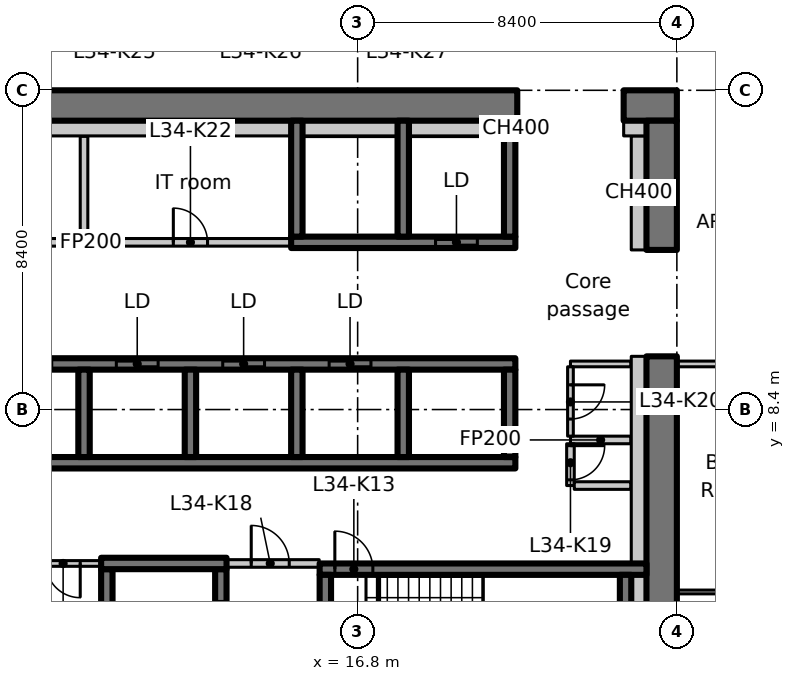
"""IFC4 building model, lengths in metres.
Left out: names, types, materials, properties, quantities, classifications, styles, units other than length and angle.
Written with IfcOpenShell. Run it as: python <this file> out.ifc"""

import sys

from ifc_helpers import new_model, si_unit, direction, frame, frame_2d, origin, place, context, subcontext, project, spatial, rectangle, extrude, element, fill, save


model = new_model("IFC4")
c1 = context("Model", 3, precision=1e-05, world=origin(), true_north=direction((0.0, 1.0)))
c2 = subcontext(c1, "Body", "Model", "MODEL_VIEW")
j1 = project(units=[si_unit("LENGTHUNIT", "METRE"), si_unit("PLANEANGLEUNIT", "RADIAN")], contexts=[c1])
p1 = place(None, origin())
s1 = spatial("IfcSite", under=j1, at=p1, CompositionType="ELEMENT")
p2 = place(p1, origin())
s2 = spatial("IfcBuilding", under=s1, at=p2, CompositionType="ELEMENT")
p3 = place(p2, frame((0.0, 0.0, 138.5)))
s3 = spatial("IfcBuildingStorey", under=s2, at=p3, CompositionType="ELEMENT", Elevation=138.5)
p4 = place(p3, frame((-1.1, 16.4, 0.0), z_axis=(0.0, 0.0, 1.0), x_axis=(1.0, 0.0, 0.0)))
e1 = element("IfcWall", 1, at=p4, inside=s3, PredefinedType="SHEAR", context=c2, shape_type="SweptSolid", body=[
    extrude(rectangle(XDim=22.1, YDim=0.8, at=frame_2d((11.05, 0.0))), origin(), (0.0, 0.0, 1.0), 3.35),
])
p5 = place(p4, frame((3.15, 0.0, 0.0)))
e2 = element("IfcOpeningElement", 2, at=p5, cuts=e1, PredefinedType="OPENING", context=c2, shape_type="SweptSolid", body=[
    extrude(rectangle(XDim=1.1, YDim=2.3, at=frame_2d((0.55, 1.15))), frame((0.0, 0.41, 0.0), z_axis=(0.0, -1.0, 0.0), x_axis=(1.0, 0.0, 0.0)), (0.0, 0.0, 1.0), 0.82),
])
p6 = place(p3, frame((23.8, 16.4, 0.0), z_axis=(0.0, 0.0, 1.0), x_axis=(1.0, 0.0, 0.0)))
e3 = element("IfcWall", 3, at=p6, inside=s3, PredefinedType="SHEAR", context=c2, shape_type="SweptSolid", body=[
    extrude(rectangle(XDim=1.4, YDim=0.8, at=frame_2d((0.7, 0.0))), origin(), (0.0, 0.0, 1.0), 3.35),
])
p7 = place(p3, frame((24.8, 0.8, 0.0), z_axis=(0.0, 0.0, 1.0), x_axis=(0.0, 1.0, 0.0)))
e4 = element("IfcWall", 4, at=p7, inside=s3, PredefinedType="SHEAR", context=c2, shape_type="SweptSolid", body=[
    extrude(rectangle(XDim=9.0, YDim=0.8, at=frame_2d((4.5, 0.0))), origin(), (0.0, 0.0, 1.0), 3.35),
])
p8 = place(p3, frame((24.8, 12.6, 0.0), z_axis=(0.0, 0.0, 1.0), x_axis=(0.0, 1.0, 0.0)))
e5 = element("IfcWall", 5, at=p8, inside=s3, PredefinedType="SHEAR", context=c2, shape_type="SweptSolid", body=[
    extrude(rectangle(XDim=3.4, YDim=0.8, at=frame_2d((1.7, 0.0))), origin(), (0.0, 0.0, 1.0), 3.35),
])
p9 = place(p3, frame((24.2, 12.6, 0.0), z_axis=(0.0, 0.0, 1.0), x_axis=(0.0, 1.0, 0.0)))
e6 = element("IfcWall", 6, at=p9, inside=s3, PredefinedType="PARTITIONING", context=c2, shape_type="SweptSolid", body=[
    extrude(rectangle(XDim=3.0, YDim=0.4, at=frame_2d((1.5, 0.0))), origin(), (0.0, 0.0, 1.0), 3.35),
])
p10 = place(p3, frame((23.8, 15.8, 0.0), z_axis=(0.0, 0.0, 1.0), x_axis=(1.0, 0.0, 0.0)))
e7 = element("IfcWall", 7, at=p10, inside=s3, PredefinedType="PARTITIONING", context=c2, shape_type="SweptSolid", body=[
    extrude(rectangle(XDim=0.6, YDim=0.4, at=frame_2d((0.3, 0.0))), origin(), (0.0, 0.0, 1.0), 3.35),
])
p11 = place(p3, frame((0.8, 7.0, 0.0), z_axis=(0.0, 0.0, 1.0), x_axis=(1.0, 0.0, 0.0)))
e8 = element("IfcWall", 8, at=p11, inside=s3, PredefinedType="SHEAR", context=c2, shape_type="SweptSolid", body=[
    extrude(rectangle(XDim=20.15, YDim=0.3, at=frame_2d((10.075, 0.0))), origin(), (0.0, 0.0, 1.0), 3.35),
])
p12 = place(p3, frame((0.8, 9.6, 0.0), z_axis=(0.0, 0.0, 1.0), x_axis=(1.0, 0.0, 0.0)))
e9 = element("IfcWall", 9, at=p12, inside=s3, PredefinedType="SHEAR", context=c2, shape_type="SweptSolid", body=[
    extrude(rectangle(XDim=20.15, YDim=0.3, at=frame_2d((10.075, 0.0))), origin(), (0.0, 0.0, 1.0), 3.35),
])
p13 = place(p12, frame((1.25, 0.0, 0.0)))
e10 = element("IfcOpeningElement", 10, at=p13, cuts=e9, PredefinedType="OPENING", context=c2, shape_type="SweptSolid", body=[
    extrude(rectangle(XDim=1.1, YDim=2.3, at=frame_2d((0.55, 1.15))), frame((0.0, 0.16, 0.0), z_axis=(0.0, -1.0, 0.0), x_axis=(1.0, 0.0, 0.0)), (0.0, 0.0, 1.0), 0.32),
])
p14 = place(p12, frame((4.05, 0.0, 0.0)))
e11 = element("IfcOpeningElement", 11, at=p14, cuts=e9, PredefinedType="OPENING", context=c2, shape_type="SweptSolid", body=[
    extrude(rectangle(XDim=1.1, YDim=2.3, at=frame_2d((0.55, 1.15))), frame((0.0, 0.16, 0.0), z_axis=(0.0, -1.0, 0.0), x_axis=(1.0, 0.0, 0.0)), (0.0, 0.0, 1.0), 0.32),
])
p15 = place(p12, frame((6.85, 0.0, 0.0)))
e12 = element("IfcOpeningElement", 12, at=p15, cuts=e9, PredefinedType="OPENING", context=c2, shape_type="SweptSolid", body=[
    extrude(rectangle(XDim=1.1, YDim=2.3, at=frame_2d((0.55, 1.15))), frame((0.0, 0.16, 0.0), z_axis=(0.0, -1.0, 0.0), x_axis=(1.0, 0.0, 0.0)), (0.0, 0.0, 1.0), 0.32),
])
p16 = place(p12, frame((9.65, 0.0, 0.0)))
e13 = element("IfcOpeningElement", 13, at=p16, cuts=e9, PredefinedType="OPENING", context=c2, shape_type="SweptSolid", body=[
    extrude(rectangle(XDim=1.1, YDim=2.3, at=frame_2d((0.55, 1.15))), frame((0.0, 0.16, 0.0), z_axis=(0.0, -1.0, 0.0), x_axis=(1.0, 0.0, 0.0)), (0.0, 0.0, 1.0), 0.32),
])
p17 = place(p12, frame((12.45, 0.0, 0.0)))
e14 = element("IfcOpeningElement", 14, at=p17, cuts=e9, PredefinedType="OPENING", context=c2, shape_type="SweptSolid", body=[
    extrude(rectangle(XDim=1.1, YDim=2.3, at=frame_2d((0.55, 1.15))), frame((0.0, 0.16, 0.0), z_axis=(0.0, -1.0, 0.0), x_axis=(1.0, 0.0, 0.0)), (0.0, 0.0, 1.0), 0.32),
])
p18 = place(p12, frame((15.25, 0.0, 0.0)))
e15 = element("IfcOpeningElement", 15, at=p18, cuts=e9, PredefinedType="OPENING", context=c2, shape_type="SweptSolid", body=[
    extrude(rectangle(XDim=1.1, YDim=2.3, at=frame_2d((0.55, 1.15))), frame((0.0, 0.16, 0.0), z_axis=(0.0, -1.0, 0.0), x_axis=(1.0, 0.0, 0.0)), (0.0, 0.0, 1.0), 0.32),
])
for number, where, z_axis, x_axis in (
    (16, (9.6, 7.15, 0.0), (0.0, 0.0, 1.0), (0.0, 1.0, 0.0)),
    (17, (12.4, 7.15, 0.0), (0.0, 0.0, 1.0), (0.0, 1.0, 0.0)),
    (18, (15.2, 7.15, 0.0), (0.0, 0.0, 1.0), (0.0, 1.0, 0.0)),
    (19, (18.0, 7.15, 0.0), (0.0, 0.0, 1.0), (0.0, 1.0, 0.0)),
    (20, (20.8, 7.15, 0.0), (0.0, 0.0, 1.0), (0.0, 1.0, 0.0)),
):
    element("IfcWall", number, at=place(p3, frame(where, z_axis=z_axis, x_axis=x_axis)), inside=s3, PredefinedType="SHEAR", context=c2, shape_type="SweptSolid", body=[
        extrude(rectangle(XDim=2.3, YDim=0.3, at=frame_2d((1.15, 0.0))), origin(), (0.0, 0.0, 1.0), 3.35),
    ])
p19 = place(p3, frame((15.05, 12.8, 0.0), z_axis=(0.0, 0.0, 1.0), x_axis=(1.0, 0.0, 0.0)))
e21 = element("IfcWall", 21, at=p19, inside=s3, PredefinedType="SHEAR", context=c2, shape_type="SweptSolid", body=[
    extrude(rectangle(XDim=5.9, YDim=0.3, at=frame_2d((2.95, 0.0))), origin(), (0.0, 0.0, 1.0), 3.35),
])
p20 = place(p19, frame((3.8, 0.0, 0.0)))
e22 = element("IfcOpeningElement", 22, at=p20, cuts=e21, PredefinedType="OPENING", context=c2, shape_type="SweptSolid", body=[
    extrude(rectangle(XDim=1.1, YDim=2.3, at=frame_2d((0.55, 1.15))), frame((0.0, 0.16, 0.0), z_axis=(0.0, -1.0, 0.0), x_axis=(1.0, 0.0, 0.0)), (0.0, 0.0, 1.0), 0.32),
])
for number, where, z_axis, x_axis in (
    (23, (15.2, 12.95, 0.0), (0.0, 0.0, 1.0), (0.0, 1.0, 0.0)),
    (24, (18.0, 12.95, 0.0), (0.0, 0.0, 1.0), (0.0, 1.0, 0.0)),
    (25, (20.8, 12.95, 0.0), (0.0, 0.0, 1.0), (0.0, 1.0, 0.0)),
):
    element("IfcWall", number, at=place(p3, frame(where, z_axis=z_axis, x_axis=x_axis)), inside=s3, PredefinedType="SHEAR", context=c2, shape_type="SweptSolid", body=[
        extrude(rectangle(XDim=3.05, YDim=0.3, at=frame_2d((1.525, 0.0))), origin(), (0.0, 0.0, 1.0), 3.35),
    ])
p21 = place(p3, frame((10.2, 0.8, 0.0), z_axis=(0.0, 0.0, 1.0), x_axis=(0.0, 1.0, 0.0)))
e26 = element("IfcWall", 26, at=p21, inside=s3, PredefinedType="SHEAR", context=c2, shape_type="SweptSolid", body=[
    extrude(rectangle(XDim=3.4, YDim=0.3, at=frame_2d((1.7, 0.0))), origin(), (0.0, 0.0, 1.0), 3.35),
])
p22 = place(p3, frame((13.2, 0.8, 0.0), z_axis=(0.0, 0.0, 1.0), x_axis=(0.0, 1.0, 0.0)))
e27 = element("IfcWall", 27, at=p22, inside=s3, PredefinedType="SHEAR", context=c2, shape_type="SweptSolid", body=[
    extrude(rectangle(XDim=3.4, YDim=0.3, at=frame_2d((1.7, 0.0))), origin(), (0.0, 0.0, 1.0), 3.35),
])
p23 = place(p22, frame((1.45, 0.0, 0.0)))
e28 = element("IfcOpeningElement", 28, at=p23, cuts=e27, PredefinedType="OPENING", context=c2, shape_type="SweptSolid", body=[
    extrude(rectangle(XDim=1.1, YDim=2.3, at=frame_2d((0.55, 1.15))), frame((0.0, 0.16, 0.0), z_axis=(0.0, -1.0, 0.0), x_axis=(1.0, 0.0, 0.0)), (0.0, 0.0, 1.0), 0.32),
])
p24 = place(p3, frame((10.05, 4.35, 0.0), z_axis=(0.0, 0.0, 1.0), x_axis=(1.0, 0.0, 0.0)))
e29 = element("IfcWall", 29, at=p24, inside=s3, PredefinedType="SHEAR", context=c2, shape_type="SweptSolid", body=[
    extrude(rectangle(XDim=3.3, YDim=0.3, at=frame_2d((1.65, 0.0))), origin(), (0.0, 0.0, 1.0), 3.35),
])
p25 = place(p3, frame((15.8, 4.2, 0.0), z_axis=(0.0, 0.0, 1.0), x_axis=(1.0, 0.0, 0.0)))
e30 = element("IfcWall", 30, at=p25, inside=s3, PredefinedType="SHEAR", context=c2, shape_type="SweptSolid", body=[
    extrude(rectangle(XDim=8.6, YDim=0.3, at=frame_2d((4.3, 0.0))), origin(), (0.0, 0.0, 1.0), 3.35),
])
p26 = place(p25, frame((0.4, 0.0, 0.0)))
e31 = element("IfcOpeningElement", 31, at=p26, cuts=e30, PredefinedType="OPENING", context=c2, shape_type="SweptSolid", body=[
    extrude(rectangle(XDim=1.0, YDim=2.1, at=frame_2d((0.5, 1.05))), frame((0.0, 0.16, 0.0), z_axis=(0.0, -1.0, 0.0), x_axis=(1.0, 0.0, 0.0)), (0.0, 0.0, 1.0), 0.32),
])
p27 = place(p3, frame((15.95, 1.5, 0.0), z_axis=(0.0, 0.0, 1.0), x_axis=(0.0, 1.0, 0.0)))
e32 = element("IfcWall", 32, at=p27, inside=s3, PredefinedType="SHEAR", context=c2, shape_type="SweptSolid", body=[
    extrude(rectangle(XDim=2.55, YDim=0.3, at=frame_2d((1.275, 0.0))), origin(), (0.0, 0.0, 1.0), 3.35),
])
p28 = place(p27, frame((0.8, 0.0, 0.0)))
e33 = element("IfcOpeningElement", 33, at=p28, cuts=e32, PredefinedType="OPENING", context=c2, shape_type="SweptSolid", body=[
    extrude(rectangle(XDim=1.0, YDim=2.1, at=frame_2d((0.5, 1.05))), frame((0.0, 0.16, 0.0), z_axis=(0.0, -1.0, 0.0), x_axis=(1.0, 0.0, 0.0)), (0.0, 0.0, 1.0), 0.32),
])
p29 = place(p3, frame((23.85, 1.5, 0.0), z_axis=(0.0, 0.0, 1.0), x_axis=(0.0, 1.0, 0.0)))
e34 = element("IfcWall", 34, at=p29, inside=s3, PredefinedType="SHEAR", context=c2, shape_type="SweptSolid", body=[
    extrude(rectangle(XDim=2.55, YDim=0.3, at=frame_2d((1.275, 0.0))), origin(), (0.0, 0.0, 1.0), 3.35),
])
p30 = place(p3, frame((13.362, 4.35, 0.0), z_axis=(0.0, 0.0, 1.0), x_axis=(1.0, 0.0, 0.0)))
e35 = element("IfcWall", 35, at=p30, inside=s3, PredefinedType="PARTITIONING", context=c2, shape_type="SweptSolid", body=[
    extrude(rectangle(XDim=2.426, YDim=0.2, at=frame_2d((1.213, 0.0))), origin(), (0.0, 0.0, 1.0), 3.35),
])
p31 = place(p30, frame((0.638, 0.0, 0.0)))
e36 = element("IfcOpeningElement", 36, at=p31, cuts=e35, PredefinedType="OPENING", context=c2, shape_type="SweptSolid", body=[
    extrude(rectangle(XDim=1.0, YDim=2.1, at=frame_2d((0.5, 1.05))), frame((0.0, 0.11, 0.0), z_axis=(0.0, -1.0, 0.0), x_axis=(1.0, 0.0, 0.0)), (0.0, 0.0, 1.0), 0.22),
])
p32 = place(p3, frame((4.162, 12.8, 0.0), z_axis=(0.0, 0.0, 1.0), x_axis=(1.0, 0.0, 0.0)))
e37 = element("IfcWall", 37, at=p32, inside=s3, PredefinedType="PARTITIONING", context=c2, shape_type="SweptSolid", body=[
    extrude(rectangle(XDim=5.438, YDim=0.2, at=frame_2d((2.719, 0.0))), origin(), (0.0, 0.0, 1.0), 3.35),
])
p33 = place(p32, frame((2.188, 0.0, 0.0)))
e38 = element("IfcOpeningElement", 38, at=p33, cuts=e37, PredefinedType="OPENING", context=c2, shape_type="SweptSolid", body=[
    extrude(rectangle(XDim=0.9, YDim=2.1, at=frame_2d((0.45, 1.05))), frame((0.0, 0.11, 0.0), z_axis=(0.0, -1.0, 0.0), x_axis=(1.0, 0.0, 0.0)), (0.0, 0.0, 1.0), 0.22),
])
p34 = place(p3, frame((9.6, 12.8, 0.0), z_axis=(0.0, 0.0, 1.0), x_axis=(1.0, 0.0, 0.0)))
e39 = element("IfcWall", 39, at=p34, inside=s3, PredefinedType="PARTITIONING", context=c2, shape_type="SweptSolid", body=[
    extrude(rectangle(XDim=5.438, YDim=0.2, at=frame_2d((2.719, 0.0))), origin(), (0.0, 0.0, 1.0), 3.35),
])
p35 = place(p34, frame((2.35, 0.0, 0.0)))
e40 = element("IfcOpeningElement", 40, at=p35, cuts=e39, PredefinedType="OPENING", context=c2, shape_type="SweptSolid", body=[
    extrude(rectangle(XDim=0.9, YDim=2.1, at=frame_2d((0.45, 1.05))), frame((0.0, 0.11, 0.0), z_axis=(0.0, -1.0, 0.0), x_axis=(1.0, 0.0, 0.0)), (0.0, 0.0, 1.0), 0.22),
])
p36 = place(p3, frame((9.6, 15.588, 0.0), z_axis=(0.0, 0.0, 1.0), x_axis=(0.0, -1.0, 0.0)))
e41 = element("IfcWall", 41, at=p36, inside=s3, PredefinedType="PARTITIONING", context=c2, shape_type="SweptSolid", body=[
    extrude(rectangle(XDim=2.688, YDim=0.2, at=frame_2d((1.344, 0.0))), origin(), (0.0, 0.0, 1.0), 3.35),
])
p37 = place(p3, frame((23.988, 7.6, 0.0), z_axis=(0.0, 0.0, 1.0), x_axis=(-1.0, 0.0, 0.0)))
e42 = element("IfcWall", 42, at=p37, inside=s3, PredefinedType="PARTITIONING", context=c2, shape_type="SweptSolid", body=[
    extrude(rectangle(XDim=1.588, YDim=0.2, at=frame_2d((0.794, 0.0))), origin(), (0.0, 0.0, 1.0), 3.35),
])
p38 = place(p3, frame((22.4, 7.5, 0.0), z_axis=(0.0, 0.0, 1.0), x_axis=(0.0, -1.0, 0.0)))
e43 = element("IfcWall", 43, at=p38, inside=s3, PredefinedType="PARTITIONING", context=c2, shape_type="SweptSolid", body=[
    extrude(rectangle(XDim=1.1, YDim=0.2, at=frame_2d((0.55, 0.0))), origin(), (0.0, 0.0, 1.0), 3.35),
])
p39 = place(p38, frame((0.05, 0.0, 0.0)))
e44 = element("IfcOpeningElement", 44, at=p39, cuts=e43, PredefinedType="OPENING", context=c2, shape_type="SweptSolid", body=[
    extrude(rectangle(XDim=0.9, YDim=2.1, at=frame_2d((0.45, 1.05))), frame((0.0, 0.11, 0.0), z_axis=(0.0, -1.0, 0.0), x_axis=(1.0, 0.0, 0.0)), (0.0, 0.0, 1.0), 0.22),
])
p40 = place(p3, frame((22.5, 6.4, 0.0), z_axis=(0.0, 0.0, 1.0), x_axis=(1.0, 0.0, 0.0)))
e45 = element("IfcWall", 45, at=p40, inside=s3, PredefinedType="PARTITIONING", context=c2, shape_type="SweptSolid", body=[
    extrude(rectangle(XDim=1.488, YDim=0.2, at=frame_2d((0.744, 0.0))), origin(), (0.0, 0.0, 1.0), 3.35),
])
p41 = place(p3, frame((10.038, 4.35, 0.0), z_axis=(0.0, 0.0, 1.0), x_axis=(-1.0, 0.0, 0.0)))
e46 = element("IfcWall", 46, at=p41, inside=s3, PredefinedType="PARTITIONING", context=c2, shape_type="SweptSolid", body=[
    extrude(rectangle(XDim=2.063, YDim=0.15, at=frame_2d((1.031, 0.0))), origin(), (0.0, 0.0, 1.0), 3.35),
])
p42 = place(p41, frame((0.538, 0.0, 0.0)))
e47 = element("IfcOpeningElement", 47, at=p42, cuts=e46, PredefinedType="OPENING", context=c2, shape_type="SweptSolid", body=[
    extrude(rectangle(XDim=0.9, YDim=2.1, at=frame_2d((0.45, 1.05))), frame((0.0, 0.085, 0.0), z_axis=(0.0, -1.0, 0.0), x_axis=(1.0, 0.0, 0.0)), (0.0, 0.0, 1.0), 0.17),
])
p43 = place(p3, frame((23.988, 9.6, 0.0), z_axis=(0.0, 0.0, 1.0), x_axis=(-1.0, 0.0, 0.0)))
e48 = element("IfcWall", 48, at=p43, inside=s3, PredefinedType="PARTITIONING", context=c2, shape_type="SweptSolid", body=[
    extrude(rectangle(XDim=1.588, YDim=0.15, at=frame_2d((0.794, 0.0))), origin(), (0.0, 0.0, 1.0), 3.35),
])
p44 = place(p3, frame((22.4, 9.525, 0.0), z_axis=(0.0, 0.0, 1.0), x_axis=(0.0, -1.0, 0.0)))
e49 = element("IfcWall", 49, at=p44, inside=s3, PredefinedType="PARTITIONING", context=c2, shape_type="SweptSolid", body=[
    extrude(rectangle(XDim=1.825, YDim=0.15, at=frame_2d((0.913, 0.0))), origin(), (0.0, 0.0, 1.0), 3.35),
])
p45 = place(p44, frame((0.475, 0.0, 0.0)))
e50 = element("IfcOpeningElement", 50, at=p45, cuts=e49, PredefinedType="OPENING", context=c2, shape_type="SweptSolid", body=[
    extrude(rectangle(XDim=0.9, YDim=2.1, at=frame_2d((0.45, 1.05))), frame((0.0, 0.085, 0.0), z_axis=(0.0, -1.0, 0.0), x_axis=(1.0, 0.0, 0.0)), (0.0, 0.0, 1.0), 0.17),
])
p46 = place(p3, frame((4.15, 15.8, 0.0), z_axis=(0.0, 0.0, 1.0), x_axis=(1.0, 0.0, 0.0)))
e51 = element("IfcWall", 51, at=p46, inside=s3, PredefinedType="PARTITIONING", context=c2, shape_type="SweptSolid", body=[
    extrude(rectangle(XDim=10.9, YDim=0.4, at=frame_2d((5.45, 0.0))), origin(), (0.0, 0.0, 1.0), 3.35),
])
for number, where, z_axis, x_axis in (
    (52, (15.35, 15.8, 0.0), (0.0, 0.0, 1.0), (1.0, 0.0, 0.0)),
    (53, (18.15, 15.8, 0.0), (0.0, 0.0, 1.0), (1.0, 0.0, 0.0)),
):
    element("IfcWall", number, at=place(p3, frame(where, z_axis=z_axis, x_axis=x_axis)), inside=s3, PredefinedType="PARTITIONING", context=c2, shape_type="SweptSolid", body=[
        extrude(rectangle(XDim=2.5, YDim=0.4, at=frame_2d((1.25, 0.0))), origin(), (0.0, 0.0, 1.0), 3.35),
    ])
p47 = place(p3, frame((20.95, 15.8, 0.0), z_axis=(0.0, 0.0, 1.0), x_axis=(1.0, 0.0, 0.0)))
e54 = element("IfcWall", 54, at=p47, inside=s3, PredefinedType="PARTITIONING", context=c2, shape_type="SweptSolid", body=[
    extrude(rectangle(XDim=0.05, YDim=0.4, at=frame_2d((0.025, 0.0))), origin(), (0.0, 0.0, 1.0), 3.35),
])
p48 = place(p3, frame((24.2, 1.5, 0.0), z_axis=(0.0, 0.0, 1.0), x_axis=(0.0, 1.0, 0.0)))
e55 = element("IfcWall", 55, at=p48, inside=s3, PredefinedType="PARTITIONING", context=c2, shape_type="SweptSolid", body=[
    extrude(rectangle(XDim=2.55, YDim=0.4, at=frame_2d((1.275, 0.0))), origin(), (0.0, 0.0, 1.0), 3.35),
])
p49 = place(p3, frame((24.2, 4.35, 0.0), z_axis=(0.0, 0.0, 1.0), x_axis=(0.0, 1.0, 0.0)))
e56 = element("IfcWall", 56, at=p49, inside=s3, PredefinedType="PARTITIONING", context=c2, shape_type="SweptSolid", body=[
    extrude(rectangle(XDim=5.45, YDim=0.4, at=frame_2d((2.725, 0.0))), origin(), (0.0, 0.0, 1.0), 3.35),
])
p50 = place(p3, frame((29.4, 9.6, 0.0), z_axis=(0.0, 0.0, 1.0), x_axis=(-1.0, 0.0, 0.0)))
e57 = element("IfcWall", 57, at=p50, inside=s3, PredefinedType="PARTITIONING", context=c2, shape_type="SweptSolid", body=[
    extrude(rectangle(XDim=4.2, YDim=0.15, at=frame_2d((2.1, 0.0))), origin(), (0.0, 0.0, 1.0), 3.33),
])
p51 = place(p3, frame((25.2, 3.6, 0.0), z_axis=(0.0, 0.0, 1.0), x_axis=(1.0, 0.0, 0.0)))
e58 = element("IfcWall", 58, at=p51, inside=s3, PredefinedType="PARTITIONING", context=c2, shape_type="SweptSolid", body=[
    extrude(rectangle(XDim=4.2, YDim=0.1, at=frame_2d((2.1, 0.0))), origin(), (0.0, 0.0, 1.0), 3.33),
])
p52 = place(p15, origin())
e59 = element("IfcDoor", 59, at=p52, inside=s3, OperationType="SLIDING_TO_LEFT", PredefinedType="DOOR", context=c2, shape_type="SweptSolid", body=[
    extrude(rectangle(XDim=1.1, YDim=2.3, at=frame_2d((0.55, 1.15))), frame((0.0, 0.025, 0.0), z_axis=(0.0, -1.0, 0.0), x_axis=(1.0, 0.0, 0.0)), (0.0, 0.0, 1.0), 0.05),
])
fill(e12, e59)
p53 = place(p16, origin())
e60 = element("IfcDoor", 60, at=p53, inside=s3, OperationType="SLIDING_TO_LEFT", PredefinedType="DOOR", context=c2, shape_type="SweptSolid", body=[
    extrude(rectangle(XDim=1.1, YDim=2.3, at=frame_2d((0.55, 1.15))), frame((0.0, 0.025, 0.0), z_axis=(0.0, -1.0, 0.0), x_axis=(1.0, 0.0, 0.0)), (0.0, 0.0, 1.0), 0.05),
])
fill(e13, e60)
p54 = place(p17, origin())
e61 = element("IfcDoor", 61, at=p54, inside=s3, OperationType="SLIDING_TO_LEFT", PredefinedType="DOOR", context=c2, shape_type="SweptSolid", body=[
    extrude(rectangle(XDim=1.1, YDim=2.3, at=frame_2d((0.55, 1.15))), frame((0.0, 0.025, 0.0), z_axis=(0.0, -1.0, 0.0), x_axis=(1.0, 0.0, 0.0)), (0.0, 0.0, 1.0), 0.05),
])
fill(e14, e61)
p55 = place(p18, origin())
e62 = element("IfcDoor", 62, at=p55, inside=s3, OperationType="SLIDING_TO_LEFT", PredefinedType="DOOR", context=c2, shape_type="SweptSolid", body=[
    extrude(rectangle(XDim=1.1, YDim=2.3, at=frame_2d((0.55, 1.15))), frame((0.0, 0.025, 0.0), z_axis=(0.0, -1.0, 0.0), x_axis=(1.0, 0.0, 0.0)), (0.0, 0.0, 1.0), 0.05),
])
fill(e15, e62)
p56 = place(p20, origin())
e63 = element("IfcDoor", 63, at=p56, inside=s3, OperationType="SLIDING_TO_LEFT", PredefinedType="DOOR", context=c2, shape_type="SweptSolid", body=[
    extrude(rectangle(XDim=1.1, YDim=2.3, at=frame_2d((0.55, 1.15))), frame((0.0, 0.025, 0.0), z_axis=(0.0, -1.0, 0.0), x_axis=(1.0, 0.0, 0.0)), (0.0, 0.0, 1.0), 0.05),
])
fill(e22, e63)
p57 = place(p26, origin())
e64 = element("IfcDoor", 64, at=p57, inside=s3, OperationType="SINGLE_SWING_LEFT", PredefinedType="DOOR", context=c2, shape_type="SweptSolid", body=[
    extrude(rectangle(XDim=1.0, YDim=2.1, at=frame_2d((0.5, 1.05))), frame((0.0, 0.025, 0.0), z_axis=(0.0, -1.0, 0.0), x_axis=(1.0, 0.0, 0.0)), (0.0, 0.0, 1.0), 0.05),
])
fill(e31, e64)
p58 = place(p42, origin())
e65 = element("IfcDoor", 65, at=p58, inside=s3, OperationType="SINGLE_SWING_LEFT", PredefinedType="DOOR", context=c2, shape_type="SweptSolid", body=[
    extrude(rectangle(XDim=0.9, YDim=2.1, at=frame_2d((0.45, 1.05))), frame((0.0, 0.025, 0.0), z_axis=(0.0, -1.0, 0.0), x_axis=(1.0, 0.0, 0.0)), (0.0, 0.0, 1.0), 0.05),
])
fill(e47, e65)
p59 = place(p31, origin())
e66 = element("IfcDoor", 66, at=p59, inside=s3, OperationType="SINGLE_SWING_RIGHT", PredefinedType="DOOR", context=c2, shape_type="SweptSolid", body=[
    extrude(rectangle(XDim=1.0, YDim=2.1, at=frame_2d((0.5, 1.05))), frame((0.0, 0.025, 0.0), z_axis=(0.0, -1.0, 0.0), x_axis=(1.0, 0.0, 0.0)), (0.0, 0.0, 1.0), 0.05),
])
fill(e36, e66)
p60 = place(p39, origin())
e67 = element("IfcDoor", 67, at=p60, inside=s3, OperationType="SINGLE_SWING_LEFT", PredefinedType="DOOR", context=c2, shape_type="SweptSolid", body=[
    extrude(rectangle(XDim=0.9, YDim=2.1, at=frame_2d((0.45, 1.05))), frame((0.0, 0.025, 0.0), z_axis=(0.0, -1.0, 0.0), x_axis=(1.0, 0.0, 0.0)), (0.0, 0.0, 1.0), 0.05),
])
fill(e44, e67)
p61 = place(p45, origin())
e68 = element("IfcDoor", 68, at=p61, inside=s3, OperationType="SINGLE_SWING_RIGHT", PredefinedType="DOOR", context=c2, shape_type="SweptSolid", body=[
    extrude(rectangle(XDim=0.9, YDim=2.1, at=frame_2d((0.45, 1.05))), frame((0.0, 0.025, 0.0), z_axis=(0.0, -1.0, 0.0), x_axis=(1.0, 0.0, 0.0)), (0.0, 0.0, 1.0), 0.05),
])
fill(e50, e68)
p62 = place(p35, origin())
e69 = element("IfcDoor", 69, at=p62, inside=s3, OperationType="SINGLE_SWING_RIGHT", PredefinedType="DOOR", context=c2, shape_type="SweptSolid", body=[
    extrude(rectangle(XDim=0.9, YDim=2.1, at=frame_2d((0.45, 1.05))), frame((0.0, 0.025, 0.0), z_axis=(0.0, -1.0, 0.0), x_axis=(1.0, 0.0, 0.0)), (0.0, 0.0, 1.0), 0.05),
])
fill(e40, e69)
save(model, sys.argv[1])
